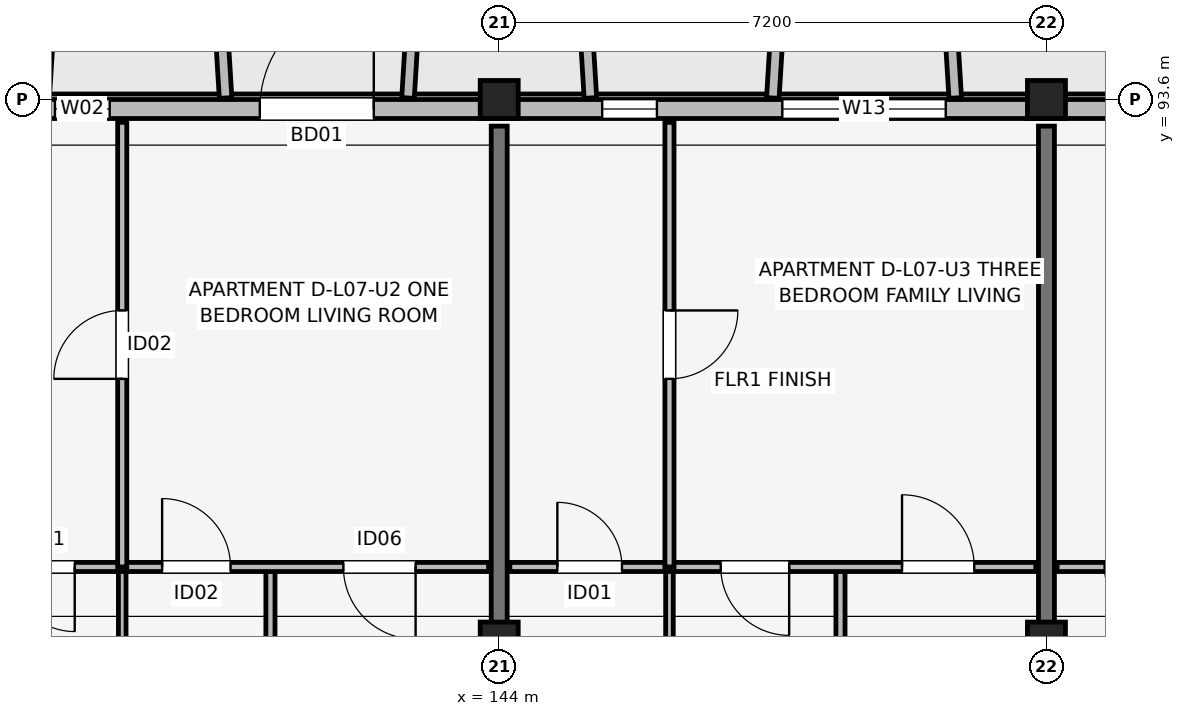
"""IFC4 building model, lengths in metres.
Left out: names, types, materials, properties, quantities, classifications, styles, units other than length and angle.
Written with IfcOpenShell. Run it as: python <this file> out.ifc"""

import sys

from ifc_helpers import new_model, si_unit, direction, frame, frame_2d, origin, origin_2d, place, context, subcontext, project, spatial, rectangle, extrude, element, fill, save


model = new_model("IFC4")
c1 = context("Model", 3, precision=1e-05, world=origin(), true_north=direction((0.0, 1.0)))
c2 = subcontext(c1, "Body", "Model", "MODEL_VIEW")
j1 = project(units=[si_unit("LENGTHUNIT", "METRE"), si_unit("PLANEANGLEUNIT", "RADIAN")], contexts=[c1])
p1 = place(None, origin())
s1 = spatial("IfcSite", under=j1, at=p1, CompositionType="ELEMENT")
p2 = place(p1, origin())
s2 = spatial("IfcBuilding", under=s1, at=p2, CompositionType="ELEMENT")
p3 = place(p2, frame((0.0, 0.0, 24.45)))
s3 = spatial("IfcBuildingStorey", under=s2, at=p3, CompositionType="ELEMENT", Elevation=24.45)
p4 = place(p3, frame((144.0, 86.4, 0.0), z_axis=(0.0, 0.0, 1.0), x_axis=(1.0, 0.0, 0.0)))
e1 = element("IfcColumn", 1, at=p4, inside=s3, PredefinedType="COLUMN", context=c2, shape_type="SweptSolid", body=[
    extrude(rectangle(XDim=0.5, YDim=0.65, at=origin_2d()), origin(), (0.0, 0.0, 1.0), 3.15),
])
p5 = place(p3, frame((144.0, 93.6, 0.0), z_axis=(0.0, 0.0, 1.0), x_axis=(1.0, 0.0, 0.0)))
e2 = element("IfcColumn", 2, at=p5, inside=s3, PredefinedType="COLUMN", context=c2, shape_type="SweptSolid", body=[
    extrude(rectangle(XDim=0.5, YDim=0.5, at=origin_2d()), origin(), (0.0, 0.0, 1.0), 3.15),
])
p6 = place(p3, frame((151.2, 86.4, 0.0), z_axis=(0.0, 0.0, 1.0), x_axis=(1.0, 0.0, 0.0)))
e3 = element("IfcColumn", 3, at=p6, inside=s3, PredefinedType="COLUMN", context=c2, shape_type="SweptSolid", body=[
    extrude(rectangle(XDim=0.5, YDim=0.65, at=origin_2d()), origin(), (0.0, 0.0, 1.0), 3.15),
])
p7 = place(p3, frame((151.2, 93.6, 0.0), z_axis=(0.0, 0.0, 1.0), x_axis=(1.0, 0.0, 0.0)))
e4 = element("IfcColumn", 4, at=p7, inside=s3, PredefinedType="COLUMN", context=c2, shape_type="SweptSolid", body=[
    extrude(rectangle(XDim=0.5, YDim=0.5, at=origin_2d()), origin(), (0.0, 0.0, 1.0), 3.15),
])
for number, where, z_axis, x_axis in (
    (5, (144.0, 83.85, 0.0), (0.0, 0.0, 1.0), (0.0, 1.0, 0.0)),
    (6, (151.2, 83.85, 0.0), (0.0, 0.0, 1.0), (0.0, 1.0, 0.0)),
):
    element("IfcWall", number, at=place(p3, frame(where, z_axis=z_axis, x_axis=x_axis)), inside=s3, PredefinedType="SHEAR", context=c2, shape_type="SweptSolid", body=[
        extrude(rectangle(XDim=9.4, YDim=0.21, at=frame_2d((4.7, 0.0))), origin(), (0.0, 0.0, 1.0), 3.15),
    ])
p8 = place(p3, frame((162.8, 93.475, 0.0), z_axis=(0.0, 0.0, 1.0), x_axis=(-1.0, 0.0, 0.0)))
e7 = element("IfcWall", 7, at=p8, inside=s3, PredefinedType="SOLIDWALL", context=c2, shape_type="SweptSolid", body=[
    extrude(rectangle(XDim=30.4, YDim=0.25, at=frame_2d((15.2, 0.0))), origin(), (0.0, 0.0, 1.0), 2.43),
])
p9 = place(p8, frame((21.95, 0.0, 0.0), z_axis=(0.0, 0.0, 1.0), x_axis=(-1.0, 0.0, 0.0)))
e8 = element("IfcOpeningElement", 8, at=p9, cuts=e7, PredefinedType="OPENING", context=c2, shape_type="SweptSolid", body=[
    extrude(rectangle(XDim=1.5, YDim=2.15, at=frame_2d((0.75, 1.075))), frame((0.0, 0.135, 0.0), z_axis=(0.0, -1.0, 0.0), x_axis=(1.0, 0.0, 0.0)), (0.0, 0.0, 1.0), 0.27),
])
p10 = place(p8, frame((7.7, 0.0, 0.0), z_axis=(0.0, 0.0, 1.0), x_axis=(-1.0, 0.0, 0.0)))
e9 = element("IfcOpeningElement", 9, at=p10, cuts=e7, PredefinedType="OPENING", context=c2, shape_type="SweptSolid", body=[
    extrude(rectangle(XDim=1.8, YDim=2.15, at=frame_2d((0.9, 1.075))), frame((0.0, 0.135, 0.0), z_axis=(0.0, -1.0, 0.0), x_axis=(1.0, 0.0, 0.0)), (0.0, 0.0, 1.0), 0.27),
])
p11 = place(p8, frame((27.97, 0.0, 0.7)))
e10 = element("IfcOpeningElement", 10, at=p11, cuts=e7, PredefinedType="OPENING", context=c2, shape_type="SweptSolid", body=[
    extrude(rectangle(XDim=1.46, YDim=1.55, at=frame_2d((0.73, 0.775))), frame((0.0, 0.135, 0.0), z_axis=(0.0, -1.0, 0.0), x_axis=(1.0, 0.0, 0.0)), (0.0, 0.0, 1.0), 0.27),
])
p12 = place(p8, frame((26.445, 0.0, 0.75)))
e11 = element("IfcOpeningElement", 11, at=p12, cuts=e7, PredefinedType="OPENING", context=c2, shape_type="SweptSolid", body=[
    extrude(rectangle(XDim=0.6, YDim=1.25, at=frame_2d((0.3, 0.625))), frame((0.0, 0.135, 0.0), z_axis=(0.0, -1.0, 0.0), x_axis=(1.0, 0.0, 0.0)), (0.0, 0.0, 1.0), 0.27),
])
p13 = place(p8, frame((23.925, 0.0, 0.75)))
e12 = element("IfcOpeningElement", 12, at=p13, cuts=e7, PredefinedType="OPENING", context=c2, shape_type="SweptSolid", body=[
    extrude(rectangle(XDim=0.72, YDim=1.35, at=frame_2d((0.36, 0.675))), frame((0.0, 0.135, 0.0), z_axis=(0.0, -1.0, 0.0), x_axis=(1.0, 0.0, 0.0)), (0.0, 0.0, 1.0), 0.27),
])
p14 = place(p8, frame((16.725, 0.0, 0.75)))
e13 = element("IfcOpeningElement", 13, at=p14, cuts=e7, PredefinedType="OPENING", context=c2, shape_type="SweptSolid", body=[
    extrude(rectangle(XDim=0.72, YDim=1.35, at=frame_2d((0.36, 0.675))), frame((0.0, 0.135, 0.0), z_axis=(0.0, -1.0, 0.0), x_axis=(1.0, 0.0, 0.0)), (0.0, 0.0, 1.0), 0.27),
])
p15 = place(p8, frame((12.925, 0.0, 0.67)))
e14 = element("IfcOpeningElement", 14, at=p15, cuts=e7, PredefinedType="OPENING", context=c2, shape_type="SweptSolid", body=[
    extrude(rectangle(XDim=2.15, YDim=1.65, at=frame_2d((1.075, 0.825))), frame((0.0, 0.135, 0.0), z_axis=(0.0, -1.0, 0.0), x_axis=(1.0, 0.0, 0.0)), (0.0, 0.0, 1.0), 0.27),
])
p16 = place(p8, frame((3.355, 0.0, 0.75)))
e15 = element("IfcOpeningElement", 15, at=p16, cuts=e7, PredefinedType="OPENING", context=c2, shape_type="SweptSolid", body=[
    extrude(rectangle(XDim=0.6, YDim=1.25, at=frame_2d((0.3, 0.625))), frame((0.0, 0.135, 0.0), z_axis=(0.0, -1.0, 0.0), x_axis=(1.0, 0.0, 0.0)), (0.0, 0.0, 1.0), 0.27),
])
p17 = place(p8, frame((0.96, 0.0, 0.75)))
e16 = element("IfcOpeningElement", 16, at=p17, cuts=e7, PredefinedType="OPENING", context=c2, shape_type="SweptSolid", body=[
    extrude(rectangle(XDim=1.22, YDim=1.5, at=frame_2d((0.61, 0.75))), frame((0.0, 0.135, 0.0), z_axis=(0.0, -1.0, 0.0), x_axis=(1.0, 0.0, 0.0)), (0.0, 0.0, 1.0), 0.27),
])
for number, where, z_axis, x_axis in (
    (17, (138.0, 93.62, 0.0), (0.0, 0.0, 1.0), (0.061, 0.998, 0.0)),
    (18, (140.4, 93.62, 0.0), (0.0, 0.0, 1.0), (-0.061, 0.998, 0.0)),
    (19, (142.8, 93.62, 0.0), (0.0, 0.0, 1.0), (0.061, 0.998, 0.0)),
):
    element("IfcWall", number, at=place(p3, frame(where, z_axis=z_axis, x_axis=x_axis)), inside=s3, PredefinedType="ELEMENTEDWALL", context=c2, shape_type="SweptSolid", body=[
        extrude(rectangle(XDim=1.964, YDim=0.165, at=frame_2d((0.982, 0.0))), origin(), (0.0, 0.0, 1.0), 2.45),
    ])
for number, where, z_axis, x_axis in (
    (20, (145.2, 93.62, 0.0), (0.0, 0.0, 1.0), (-0.061, 0.998, 0.0)),
    (21, (147.6, 93.62, 0.0), (0.0, 0.0, 1.0), (0.061, 0.998, 0.0)),
    (22, (150.0, 93.62, 0.0), (0.0, 0.0, 1.0), (-0.061, 0.998, 0.0)),
):
    element("IfcWall", number, at=place(p3, frame(where, z_axis=z_axis, x_axis=x_axis)), inside=s3, PredefinedType="ELEMENTEDWALL", context=c2, shape_type="SweptSolid", body=[
        extrude(rectangle(XDim=1.964, YDim=0.165, at=frame_2d((0.982, 0.0))), origin(), (0.0, 0.0, 1.0), 2.48),
    ])
p18 = place(p3, frame((139.04, 83.7, 0.0), z_axis=(0.0, 0.0, 1.0), x_axis=(0.0, 1.0, 0.0)))
e23 = element("IfcWall", 23, at=p18, inside=s3, PredefinedType="PARTITIONING", context=c2, shape_type="SweptSolid", body=[
    extrude(rectangle(XDim=3.75, YDim=0.1, at=frame_2d((1.875, 0.0))), origin(), (0.0, 0.0, 1.0), 2.38),
])
p19 = place(p3, frame((140.99, 83.7, 0.0), z_axis=(0.0, 0.0, 1.0), x_axis=(0.0, 1.0, 0.0)))
e24 = element("IfcWall", 24, at=p19, inside=s3, PredefinedType="PARTITIONING", context=c2, shape_type="SweptSolid", body=[
    extrude(rectangle(XDim=3.75, YDim=0.12, at=frame_2d((1.875, 0.0))), origin(), (0.0, 0.0, 1.0), 2.38),
])
p20 = place(p3, frame((136.94, 87.45, 0.0), z_axis=(0.0, 0.0, 1.0), x_axis=(1.0, 0.0, 0.0)))
e25 = element("IfcWall", 25, at=p20, inside=s3, PredefinedType="PARTITIONING", context=c2, shape_type="SweptSolid", body=[
    extrude(rectangle(XDim=6.92, YDim=0.12, at=frame_2d((3.46, 0.0))), origin(), (0.0, 0.0, 1.0), 2.38),
])
p21 = place(p20, frame((1.475, 0.0, 0.0), z_axis=(0.0, 0.0, 1.0), x_axis=(-1.0, 0.0, 0.0)))
e26 = element("IfcOpeningElement", 26, at=p21, cuts=e25, PredefinedType="OPENING", context=c2, shape_type="SweptSolid", body=[
    extrude(rectangle(XDim=0.85, YDim=2.08, at=frame_2d((0.425, 1.04))), frame((0.0, 0.07, 0.0), z_axis=(0.0, -1.0, 0.0), x_axis=(1.0, 0.0, 0.0)), (0.0, 0.0, 1.0), 0.14),
])
p22 = place(p20, frame((2.625, 0.0, 0.0)))
e27 = element("IfcOpeningElement", 27, at=p22, cuts=e25, PredefinedType="OPENING", context=c2, shape_type="SweptSolid", body=[
    extrude(rectangle(XDim=0.9, YDim=2.08, at=frame_2d((0.45, 1.04))), frame((0.0, 0.07, 0.0), z_axis=(0.0, -1.0, 0.0), x_axis=(1.0, 0.0, 0.0)), (0.0, 0.0, 1.0), 0.14),
])
p23 = place(p20, frame((5.96, 0.0, 0.0), z_axis=(0.0, 0.0, 1.0), x_axis=(-1.0, 0.0, 0.0)))
e28 = element("IfcOpeningElement", 28, at=p23, cuts=e25, PredefinedType="OPENING", context=c2, shape_type="SweptSolid", body=[
    extrude(rectangle(XDim=0.95, YDim=2.08, at=frame_2d((0.475, 1.04))), frame((0.0, 0.07, 0.0), z_axis=(0.0, -1.0, 0.0), x_axis=(1.0, 0.0, 0.0)), (0.0, 0.0, 1.0), 0.14),
])
p24 = place(p3, frame((139.04, 87.45, 0.0), z_axis=(0.0, 0.0, 1.0), x_axis=(0.0, 1.0, 0.0)))
e29 = element("IfcWall", 29, at=p24, inside=s3, PredefinedType="PARTITIONING", context=c2, shape_type="SweptSolid", body=[
    extrude(rectangle(XDim=5.85, YDim=0.12, at=frame_2d((2.925, 0.0))), origin(), (0.0, 0.0, 1.0), 2.38),
])
p25 = place(p24, frame((2.475, 0.0, 0.0)))
e30 = element("IfcOpeningElement", 30, at=p25, cuts=e29, PredefinedType="OPENING", context=c2, shape_type="SweptSolid", body=[
    extrude(rectangle(XDim=0.9, YDim=2.08, at=frame_2d((0.45, 1.04))), frame((0.0, 0.07, 0.0), z_axis=(0.0, -1.0, 0.0), x_axis=(1.0, 0.0, 0.0)), (0.0, 0.0, 1.0), 0.14),
])
p26 = place(p3, frame((146.24, 83.7, 0.0), z_axis=(0.0, 0.0, 1.0), x_axis=(0.0, 1.0, 0.0)))
e31 = element("IfcWall", 31, at=p26, inside=s3, PredefinedType="PARTITIONING", context=c2, shape_type="SweptSolid", body=[
    extrude(rectangle(XDim=3.75, YDim=0.1, at=frame_2d((1.875, 0.0))), origin(), (0.0, 0.0, 1.0), 2.38),
])
p27 = place(p3, frame((148.49, 83.7, 0.0), z_axis=(0.0, 0.0, 1.0), x_axis=(0.0, 1.0, 0.0)))
e32 = element("IfcWall", 32, at=p27, inside=s3, PredefinedType="PARTITIONING", context=c2, shape_type="SweptSolid", body=[
    extrude(rectangle(XDim=3.75, YDim=0.12, at=frame_2d((1.875, 0.0))), origin(), (0.0, 0.0, 1.0), 2.38),
])
p28 = place(p3, frame((144.14, 87.45, 0.0), z_axis=(0.0, 0.0, 1.0), x_axis=(1.0, 0.0, 0.0)))
e33 = element("IfcWall", 33, at=p28, inside=s3, PredefinedType="PARTITIONING", context=c2, shape_type="SweptSolid", body=[
    extrude(rectangle(XDim=6.92, YDim=0.12, at=frame_2d((3.46, 0.0))), origin(), (0.0, 0.0, 1.0), 2.38),
])
p29 = place(p28, frame((0.625, 0.0, 0.0)))
e34 = element("IfcOpeningElement", 34, at=p29, cuts=e33, PredefinedType="OPENING", context=c2, shape_type="SweptSolid", body=[
    extrude(rectangle(XDim=0.85, YDim=2.08, at=frame_2d((0.425, 1.04))), frame((0.0, 0.07, 0.0), z_axis=(0.0, -1.0, 0.0), x_axis=(1.0, 0.0, 0.0)), (0.0, 0.0, 1.0), 0.14),
])
p30 = place(p28, frame((3.675, 0.0, 0.0), z_axis=(0.0, 0.0, 1.0), x_axis=(-1.0, 0.0, 0.0)))
e35 = element("IfcOpeningElement", 35, at=p30, cuts=e33, PredefinedType="OPENING", context=c2, shape_type="SweptSolid", body=[
    extrude(rectangle(XDim=0.9, YDim=2.08, at=frame_2d((0.45, 1.04))), frame((0.0, 0.07, 0.0), z_axis=(0.0, -1.0, 0.0), x_axis=(1.0, 0.0, 0.0)), (0.0, 0.0, 1.0), 0.14),
])
p31 = place(p28, frame((5.16, 0.0, 0.0)))
e36 = element("IfcOpeningElement", 36, at=p31, cuts=e33, PredefinedType="OPENING", context=c2, shape_type="SweptSolid", body=[
    extrude(rectangle(XDim=0.95, YDim=2.08, at=frame_2d((0.475, 1.04))), frame((0.0, 0.07, 0.0), z_axis=(0.0, -1.0, 0.0), x_axis=(1.0, 0.0, 0.0)), (0.0, 0.0, 1.0), 0.14),
])
p32 = place(p3, frame((146.24, 87.45, 0.0), z_axis=(0.0, 0.0, 1.0), x_axis=(0.0, 1.0, 0.0)))
e37 = element("IfcWall", 37, at=p32, inside=s3, PredefinedType="PARTITIONING", context=c2, shape_type="SweptSolid", body=[
    extrude(rectangle(XDim=5.85, YDim=0.12, at=frame_2d((2.925, 0.0))), origin(), (0.0, 0.0, 1.0), 2.38),
])
p33 = place(p32, frame((3.375, 0.0, 0.0), z_axis=(0.0, 0.0, 1.0), x_axis=(-1.0, 0.0, 0.0)))
e38 = element("IfcOpeningElement", 38, at=p33, cuts=e37, PredefinedType="OPENING", context=c2, shape_type="SweptSolid", body=[
    extrude(rectangle(XDim=0.9, YDim=2.08, at=frame_2d((0.45, 1.04))), frame((0.0, 0.07, 0.0), z_axis=(0.0, -1.0, 0.0), x_axis=(1.0, 0.0, 0.0)), (0.0, 0.0, 1.0), 0.14),
])
p34 = place(p3, frame((151.34, 87.45, 0.0), z_axis=(0.0, 0.0, 1.0), x_axis=(1.0, 0.0, 0.0)))
e39 = element("IfcWall", 39, at=p34, inside=s3, PredefinedType="PARTITIONING", context=c2, shape_type="SweptSolid", body=[
    extrude(rectangle(XDim=6.92, YDim=0.12, at=frame_2d((3.46, 0.0))), origin(), (0.0, 0.0, 1.0), 2.38),
])
p35 = place(p34, frame((1.475, 0.0, 0.0), z_axis=(0.0, 0.0, 1.0), x_axis=(-1.0, 0.0, 0.0)))
e40 = element("IfcOpeningElement", 40, at=p35, cuts=e39, PredefinedType="OPENING", context=c2, shape_type="SweptSolid", body=[
    extrude(rectangle(XDim=0.85, YDim=2.08, at=frame_2d((0.425, 1.04))), frame((0.0, 0.07, 0.0), z_axis=(0.0, -1.0, 0.0), x_axis=(1.0, 0.0, 0.0)), (0.0, 0.0, 1.0), 0.14),
])
p36 = place(p34, frame((2.625, 0.0, 0.0)))
e41 = element("IfcOpeningElement", 41, at=p36, cuts=e39, PredefinedType="OPENING", context=c2, shape_type="SweptSolid", body=[
    extrude(rectangle(XDim=0.9, YDim=2.08, at=frame_2d((0.45, 1.04))), frame((0.0, 0.07, 0.0), z_axis=(0.0, -1.0, 0.0), x_axis=(1.0, 0.0, 0.0)), (0.0, 0.0, 1.0), 0.14),
])
p37 = place(p34, frame((5.96, 0.0, 0.0), z_axis=(0.0, 0.0, 1.0), x_axis=(-1.0, 0.0, 0.0)))
e42 = element("IfcOpeningElement", 42, at=p37, cuts=e39, PredefinedType="OPENING", context=c2, shape_type="SweptSolid", body=[
    extrude(rectangle(XDim=0.95, YDim=2.08, at=frame_2d((0.475, 1.04))), frame((0.0, 0.07, 0.0), z_axis=(0.0, -1.0, 0.0), x_axis=(1.0, 0.0, 0.0)), (0.0, 0.0, 1.0), 0.14),
])
p38 = place(p9, origin())
e43 = element("IfcDoor", 43, at=p38, inside=s3, OperationType="SINGLE_SWING_LEFT", PredefinedType="DOOR", context=c2, shape_type="SweptSolid", body=[
    extrude(rectangle(XDim=1.5, YDim=2.15, at=frame_2d((0.75, 1.075))), frame((0.0, 0.025, 0.0), z_axis=(0.0, -1.0, 0.0), x_axis=(1.0, 0.0, 0.0)), (0.0, 0.0, 1.0), 0.05),
])
fill(e8, e43)
p39 = place(p13, origin())
e44 = element("IfcWindow", 44, at=p39, inside=s3, PartitioningType="SINGLE_PANEL", PredefinedType="WINDOW", context=c2, shape_type="SweptSolid", body=[
    extrude(rectangle(XDim=0.72, YDim=1.35, at=frame_2d((0.36, 0.675))), frame((0.0, 0.03, 0.0), z_axis=(0.0, -1.0, 0.0), x_axis=(1.0, 0.0, 0.0)), (0.0, 0.0, 1.0), 0.06),
])
fill(e12, e44)
p40 = place(p14, origin())
e45 = element("IfcWindow", 45, at=p40, inside=s3, PartitioningType="SINGLE_PANEL", PredefinedType="WINDOW", context=c2, shape_type="SweptSolid", body=[
    extrude(rectangle(XDim=0.72, YDim=1.35, at=frame_2d((0.36, 0.675))), frame((0.0, 0.03, 0.0), z_axis=(0.0, -1.0, 0.0), x_axis=(1.0, 0.0, 0.0)), (0.0, 0.0, 1.0), 0.06),
])
fill(e13, e45)
p41 = place(p15, origin())
e46 = element("IfcWindow", 46, at=p41, inside=s3, PartitioningType="SINGLE_PANEL", PredefinedType="WINDOW", context=c2, shape_type="SweptSolid", body=[
    extrude(rectangle(XDim=2.15, YDim=1.65, at=frame_2d((1.075, 0.825))), frame((0.0, 0.03, 0.0), z_axis=(0.0, -1.0, 0.0), x_axis=(1.0, 0.0, 0.0)), (0.0, 0.0, 1.0), 0.06),
])
fill(e14, e46)
p42 = place(p21, origin())
e47 = element("IfcDoor", 47, at=p42, inside=s3, OperationType="SINGLE_SWING_RIGHT", PredefinedType="DOOR", context=c2, shape_type="SweptSolid", body=[
    extrude(rectangle(XDim=0.85, YDim=2.08, at=frame_2d((0.425, 1.04))), frame((0.0, 0.025, 0.0), z_axis=(0.0, -1.0, 0.0), x_axis=(1.0, 0.0, 0.0)), (0.0, 0.0, 1.0), 0.05),
])
fill(e26, e47)
p43 = place(p22, origin())
e48 = element("IfcDoor", 48, at=p43, inside=s3, OperationType="SINGLE_SWING_LEFT", PredefinedType="DOOR", context=c2, shape_type="SweptSolid", body=[
    extrude(rectangle(XDim=0.9, YDim=2.08, at=frame_2d((0.45, 1.04))), frame((0.0, 0.025, 0.0), z_axis=(0.0, -1.0, 0.0), x_axis=(1.0, 0.0, 0.0)), (0.0, 0.0, 1.0), 0.05),
])
fill(e27, e48)
p44 = place(p23, origin())
e49 = element("IfcDoor", 49, at=p44, inside=s3, OperationType="SINGLE_SWING_RIGHT", PredefinedType="DOOR", context=c2, shape_type="SweptSolid", body=[
    extrude(rectangle(XDim=0.95, YDim=2.08, at=frame_2d((0.475, 1.04))), frame((0.0, 0.025, 0.0), z_axis=(0.0, -1.0, 0.0), x_axis=(1.0, 0.0, 0.0)), (0.0, 0.0, 1.0), 0.05),
])
fill(e28, e49)
p45 = place(p25, origin())
e50 = element("IfcDoor", 50, at=p45, inside=s3, OperationType="SINGLE_SWING_LEFT", PredefinedType="DOOR", context=c2, shape_type="SweptSolid", body=[
    extrude(rectangle(XDim=0.9, YDim=2.08, at=frame_2d((0.45, 1.04))), frame((0.0, 0.025, 0.0), z_axis=(0.0, -1.0, 0.0), x_axis=(1.0, 0.0, 0.0)), (0.0, 0.0, 1.0), 0.05),
])
fill(e30, e50)
p46 = place(p29, origin())
e51 = element("IfcDoor", 51, at=p46, inside=s3, OperationType="SINGLE_SWING_LEFT", PredefinedType="DOOR", context=c2, shape_type="SweptSolid", body=[
    extrude(rectangle(XDim=0.85, YDim=2.08, at=frame_2d((0.425, 1.04))), frame((0.0, 0.025, 0.0), z_axis=(0.0, -1.0, 0.0), x_axis=(1.0, 0.0, 0.0)), (0.0, 0.0, 1.0), 0.05),
])
fill(e34, e51)
p47 = place(p30, origin())
e52 = element("IfcDoor", 52, at=p47, inside=s3, OperationType="SINGLE_SWING_RIGHT", PredefinedType="DOOR", context=c2, shape_type="SweptSolid", body=[
    extrude(rectangle(XDim=0.9, YDim=2.08, at=frame_2d((0.45, 1.04))), frame((0.0, 0.025, 0.0), z_axis=(0.0, -1.0, 0.0), x_axis=(1.0, 0.0, 0.0)), (0.0, 0.0, 1.0), 0.05),
])
fill(e35, e52)
p48 = place(p31, origin())
e53 = element("IfcDoor", 53, at=p48, inside=s3, OperationType="SINGLE_SWING_LEFT", PredefinedType="DOOR", context=c2, shape_type="SweptSolid", body=[
    extrude(rectangle(XDim=0.95, YDim=2.08, at=frame_2d((0.475, 1.04))), frame((0.0, 0.025, 0.0), z_axis=(0.0, -1.0, 0.0), x_axis=(1.0, 0.0, 0.0)), (0.0, 0.0, 1.0), 0.05),
])
fill(e36, e53)
p49 = place(p33, origin())
e54 = element("IfcDoor", 54, at=p49, inside=s3, OperationType="SINGLE_SWING_RIGHT", PredefinedType="DOOR", context=c2, shape_type="SweptSolid", body=[
    extrude(rectangle(XDim=0.9, YDim=2.08, at=frame_2d((0.45, 1.04))), frame((0.0, 0.025, 0.0), z_axis=(0.0, -1.0, 0.0), x_axis=(1.0, 0.0, 0.0)), (0.0, 0.0, 1.0), 0.05),
])
fill(e38, e54)
p50 = place(p35, origin())
e55 = element("IfcDoor", 55, at=p50, inside=s3, OperationType="SINGLE_SWING_RIGHT", PredefinedType="DOOR", context=c2, shape_type="SweptSolid", body=[
    extrude(rectangle(XDim=0.85, YDim=2.08, at=frame_2d((0.425, 1.04))), frame((0.0, 0.025, 0.0), z_axis=(0.0, -1.0, 0.0), x_axis=(1.0, 0.0, 0.0)), (0.0, 0.0, 1.0), 0.05),
])
fill(e40, e55)
save(model, sys.argv[1])
